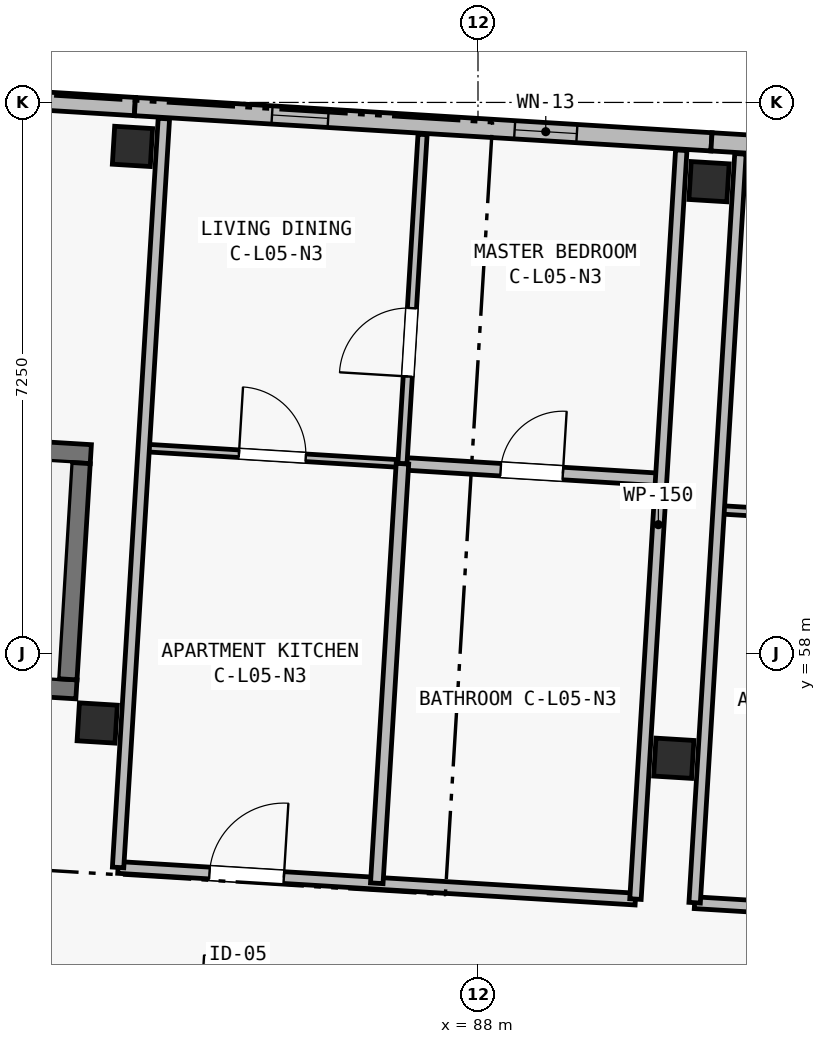
"""IFC4 building model, lengths in metres.
Left out: names, types, materials, properties, quantities, classifications, styles, units other than length and angle.
Written with IfcOpenShell. Run it as: python <this file> out.ifc"""

import sys

from ifc_helpers import new_model, si_unit, direction, frame, frame_2d, origin, origin_2d, place, context, subcontext, project, spatial, rectangle, extrude, element, fill, save


model = new_model("IFC4")
c1 = context("Model", 3, precision=1e-05, world=origin(), true_north=direction((0.0, 1.0)))
c2 = subcontext(c1, "Body", "Model", "MODEL_VIEW")
j1 = project(units=[si_unit("LENGTHUNIT", "METRE"), si_unit("PLANEANGLEUNIT", "RADIAN")], contexts=[c1])
p1 = place(None, origin())
s1 = spatial("IfcSite", under=j1, at=p1, CompositionType="ELEMENT")
p2 = place(p1, origin())
s2 = spatial("IfcBuilding", under=s1, at=p2, CompositionType="ELEMENT")
p3 = place(p2, frame((0.0, 0.0, 18.15)))
s3 = spatial("IfcBuildingStorey", under=s2, at=p3, CompositionType="ELEMENT", Elevation=18.15)
for number, where, z_axis, x_axis in (
    (1, (82.99, 57.086, 0.0), (0.0, 0.0, 1.0), (0.998, -0.061, 0.0)),
    (2, (83.454, 64.672, 0.0), (0.0, 0.0, 1.0), (0.998, -0.061, 0.0)),
    (3, (90.576, 56.622, 0.0), (0.0, 0.0, 1.0), (0.998, -0.061, 0.0)),
    (4, (91.04, 64.208, 0.0), (0.0, 0.0, 1.0), (0.998, -0.061, 0.0)),
):
    element("IfcColumn", number, at=place(p3, frame(where, z_axis=z_axis, x_axis=x_axis)), inside=s3, PredefinedType="COLUMN", context=c2, shape_type="SweptSolid", body=[
        extrude(rectangle(XDim=0.5, YDim=0.5, at=origin_2d()), origin(), (0.0, 0.0, 1.0), 3.25),
    ])
p4 = place(p3, frame((75.919, 61.05, 0.0), z_axis=(0.0, 0.0, 1.0), x_axis=(0.998135546153, -0.061036313012, 0.0)))
e5 = element("IfcWall", 5, at=p4, inside=s3, PredefinedType="SHEAR", context=c2, shape_type="SweptSolid", body=[
    extrude(rectangle(XDim=7.0, YDim=0.25, at=frame_2d((3.5, 0.0))), origin(), (0.0, 0.0, 1.0), 3.25),
])
p5 = place(p4, frame((0.45, 0.0, 0.0)))
e6 = element("IfcOpeningElement", 6, at=p5, cuts=e5, PredefinedType="OPENING", context=c2, shape_type="SweptSolid", body=[
    extrude(rectangle(XDim=0.9, YDim=2.1, at=frame_2d((0.45, 1.05))), frame((0.0, 0.14, 0.0), z_axis=(0.0, -1.0, 0.0), x_axis=(1.0, 0.0, 0.0)), (0.0, 0.0, 1.0), 0.28),
])
p6 = place(p3, frame((75.73, 57.956, 0.0), z_axis=(0.0, 0.0, 1.0), x_axis=(0.998135546153, -0.061036313012, 0.0)))
e7 = element("IfcWall", 7, at=p6, inside=s3, PredefinedType="SHEAR", context=c2, shape_type="SweptSolid", body=[
    extrude(rectangle(XDim=7.0, YDim=0.25, at=frame_2d((3.5, 0.0))), origin(), (0.0, 0.0, 1.0), 3.25),
])
p7 = place(p6, frame((0.45, 0.0, 0.0)))
e8 = element("IfcOpeningElement", 8, at=p7, cuts=e7, PredefinedType="OPENING", context=c2, shape_type="SweptSolid", body=[
    extrude(rectangle(XDim=1.05, YDim=2.15, at=frame_2d((0.525, 1.075))), frame((0.0, 0.14, 0.0), z_axis=(0.0, -1.0, 0.0), x_axis=(1.0, 0.0, 0.0)), (0.0, 0.0, 1.0), 0.28),
])
p8 = place(p3, frame((82.599, 57.661, 0.0), z_axis=(0.0, 0.0, 1.0), x_axis=(0.06107697143, 0.998133059046, 0.0)))
e9 = element("IfcWall", 9, at=p8, inside=s3, PredefinedType="SHEAR", context=c2, shape_type="SweptSolid", body=[
    extrude(rectangle(XDim=2.85, YDim=0.25, at=frame_2d((1.425, 0.0))), origin(), (0.0, 0.0, 1.0), 3.25),
])
p9 = place(p3, frame((81.115, 65.341, 0.0), z_axis=(0.0, 0.0, 1.0), x_axis=(0.998134103342, -0.061059902923, 0.0)))
e10 = element("IfcWall", 10, at=p9, inside=s3, PredefinedType="SOLIDWALL", context=c2, shape_type="SweptSolid", body=[
    extrude(rectangle(XDim=2.375, YDim=0.24, at=frame_2d((1.188, 0.0))), origin(), (0.0, 0.0, 1.0), 3.0),
])
p10 = place(p3, frame((83.486, 65.196, 0.0), z_axis=(0.0, 0.0, 1.0), x_axis=(0.998135669243, -0.061034300063, 0.0)))
e11 = element("IfcWall", 11, at=p10, inside=s3, PredefinedType="SOLIDWALL", context=c2, shape_type="SweptSolid", body=[
    extrude(rectangle(XDim=7.6, YDim=0.24, at=frame_2d((3.8, 0.0))), origin(), (0.0, 0.0, 1.0), 3.0),
])
p11 = place(p10, frame((1.807, 0.0, 0.44)))
e12 = element("IfcOpeningElement", 12, at=p11, cuts=e11, PredefinedType="OPENING", context=c2, shape_type="SweptSolid", body=[
    extrude(rectangle(XDim=0.74, YDim=2.26, at=frame_2d((0.37, 1.13))), frame((0.0, 0.135, 0.0), z_axis=(0.0, -1.0, 0.0), x_axis=(1.0, 0.0, 0.0)), (0.0, 0.0, 1.0), 0.27),
])
p12 = place(p10, frame((5.006, 0.0, 0.5)))
e13 = element("IfcOpeningElement", 13, at=p12, cuts=e11, PredefinedType="OPENING", context=c2, shape_type="SweptSolid", body=[
    extrude(rectangle(XDim=0.82, YDim=2.18, at=frame_2d((0.41, 1.09))), frame((0.0, 0.135, 0.0), z_axis=(0.0, -1.0, 0.0), x_axis=(1.0, 0.0, 0.0)), (0.0, 0.0, 1.0), 0.27),
])
p13 = place(p3, frame((91.072, 64.732, 0.0), z_axis=(0.0, 0.0, 1.0), x_axis=(0.998133591969, -0.061068261669, 0.0)))
e14 = element("IfcWall", 14, at=p13, inside=s3, PredefinedType="SOLIDWALL", context=c2, shape_type="SweptSolid", body=[
    extrude(rectangle(XDim=7.6, YDim=0.24, at=frame_2d((3.8, 0.0))), origin(), (0.0, 0.0, 1.0), 3.0),
])
p14 = place(p13, frame((1.454, 0.0, 0.5)))
e15 = element("IfcOpeningElement", 15, at=p14, cuts=e14, PredefinedType="OPENING", context=c2, shape_type="SweptSolid", body=[
    extrude(rectangle(XDim=0.58, YDim=2.16, at=frame_2d((0.29, 1.08))), frame((0.0, 0.135, 0.0), z_axis=(0.0, -1.0, 0.0), x_axis=(1.0, 0.0, 0.0)), (0.0, 0.0, 1.0), 0.27),
])
p15 = place(p13, frame((5.982, 0.0, 0.44)))
e16 = element("IfcOpeningElement", 16, at=p15, cuts=e14, PredefinedType="OPENING", context=c2, shape_type="SweptSolid", body=[
    extrude(rectangle(XDim=0.66, YDim=2.32, at=frame_2d((0.33, 1.16))), frame((0.0, 0.135, 0.0), z_axis=(0.0, -1.0, 0.0), x_axis=(1.0, 0.0, 0.0)), (0.0, 0.0, 1.0), 0.27),
])
p16 = place(p3, frame((83.265, 55.185, 0.0), z_axis=(0.0, 0.0, 1.0), x_axis=(0.998135531673, -0.061036549799, 0.0)))
e17 = element("IfcWall", 17, at=p16, inside=s3, PredefinedType="PARTITIONING", context=c2, shape_type="SweptSolid", body=[
    extrude(rectangle(XDim=6.82, YDim=0.155, at=frame_2d((3.41, 0.0))), origin(), (0.0, 0.0, 1.0), 2.97),
])
p17 = place(p16, frame((1.205, 0.0, 0.0)))
e18 = element("IfcOpeningElement", 18, at=p17, cuts=e17, PredefinedType="OPENING", context=c2, shape_type="SweptSolid", body=[
    extrude(rectangle(XDim=0.98, YDim=2.15, at=frame_2d((0.49, 1.075))), frame((0.0, 0.093, 0.0), z_axis=(0.0, -1.0, 0.0), x_axis=(1.0, 0.0, 0.0)), (0.0, 0.0, 1.0), 0.185),
])
p18 = place(p3, frame((83.602, 60.705, 0.0), z_axis=(0.0, 0.0, 1.0), x_axis=(0.998133617109, -0.061067850767, 0.0)))
e19 = element("IfcWall", 19, at=p18, inside=s3, PredefinedType="PARTITIONING", context=c2, shape_type="SweptSolid", body=[
    extrude(rectangle(XDim=3.41, YDim=0.1, at=frame_2d((1.705, 0.0))), origin(), (0.0, 0.0, 1.0), 2.97),
])
p19 = place(p18, frame((1.255, 0.0, 0.0)))
e20 = element("IfcOpeningElement", 20, at=p19, cuts=e19, PredefinedType="OPENING", context=c2, shape_type="SweptSolid", body=[
    extrude(rectangle(XDim=0.88, YDim=2.1, at=frame_2d((0.44, 1.05))), frame((0.0, 0.065, 0.0), z_axis=(0.0, -1.0, 0.0), x_axis=(1.0, 0.0, 0.0)), (0.0, 0.0, 1.0), 0.13),
])
p20 = place(p3, frame((87.006, 60.497, 0.0), z_axis=(0.0, 0.0, 1.0), x_axis=(0.998137711988, -0.061000884486, 0.0)))
e21 = element("IfcWall", 21, at=p20, inside=s3, PredefinedType="PLUMBINGWALL", context=c2, shape_type="SweptSolid", body=[
    extrude(rectangle(XDim=3.41, YDim=0.165, at=frame_2d((1.705, 0.0))), origin(), (0.0, 0.0, 1.0), 2.97),
])
p21 = place(p20, frame((1.295, 0.0, 0.0)))
e22 = element("IfcOpeningElement", 22, at=p21, cuts=e21, PredefinedType="OPENING", context=c2, shape_type="SweptSolid", body=[
    extrude(rectangle(XDim=0.82, YDim=2.08, at=frame_2d((0.41, 1.04))), frame((0.0, 0.097, 0.0), z_axis=(0.0, -1.0, 0.0), x_axis=(1.0, 0.0, 0.0)), (0.0, 0.0, 1.0), 0.195),
])
p22 = place(p3, frame((87.006, 60.497, 0.0), z_axis=(0.0, 0.0, 1.0), x_axis=(0.06103343432, 0.998135722182, 0.0)))
e23 = element("IfcWall", 23, at=p22, inside=s3, PredefinedType="PARTITIONING", context=c2, shape_type="SweptSolid", body=[
    extrude(rectangle(XDim=4.34, YDim=0.12, at=frame_2d((2.17, 0.0))), origin(), (0.0, 0.0, 1.0), 2.97),
])
p23 = place(p22, frame((1.15, 0.0, 0.0)))
e24 = element("IfcOpeningElement", 24, at=p23, cuts=e23, PredefinedType="OPENING", context=c2, shape_type="SweptSolid", body=[
    extrude(rectangle(XDim=0.9, YDim=2.1, at=frame_2d((0.45, 1.05))), frame((0.0, 0.075, 0.0), z_axis=(0.0, -1.0, 0.0), x_axis=(1.0, 0.0, 0.0)), (0.0, 0.0, 1.0), 0.15),
])
p24 = place(p3, frame((86.668, 54.977, 0.0), z_axis=(0.0, 0.0, 1.0), x_axis=(0.061058897293, 0.99813416486, 0.0)))
e25 = element("IfcWall", 25, at=p24, inside=s3, PredefinedType="PLUMBINGWALL", context=c2, shape_type="SweptSolid", body=[
    extrude(rectangle(XDim=5.53, YDim=0.165, at=frame_2d((2.765, 0.0))), origin(), (0.0, 0.0, 1.0), 2.97),
])
p25 = place(p3, frame((83.265, 55.185, 0.0), z_axis=(0.0, 0.0, 1.0), x_axis=(0.061046193261, 0.998134941923, 0.0)))
e26 = element("IfcWall", 26, at=p25, inside=s3, PredefinedType="PARTITIONING", context=c2, shape_type="SweptSolid", body=[
    extrude(rectangle(XDim=9.87, YDim=0.15, at=frame_2d((4.935, 0.0))), origin(), (0.0, 0.0, 1.0), 2.97),
])
p26 = place(p3, frame((90.072, 54.769, 0.0), z_axis=(0.0, 0.0, 1.0), x_axis=(0.061047700465, 0.998134849741, 0.0)))
e27 = element("IfcWall", 27, at=p26, inside=s3, PredefinedType="PARTITIONING", context=c2, shape_type="SweptSolid", body=[
    extrude(rectangle(XDim=9.87, YDim=0.15, at=frame_2d((4.935, 0.0))), origin(), (0.0, 0.0, 1.0), 2.97),
])
p27 = place(p3, frame((90.85, 54.721, 0.0), z_axis=(0.0, 0.0, 1.0), x_axis=(0.998135665032, -0.06103436893, 0.0)))
e28 = element("IfcWall", 28, at=p27, inside=s3, PredefinedType="PARTITIONING", context=c2, shape_type="SweptSolid", body=[
    extrude(rectangle(XDim=6.82, YDim=0.155, at=frame_2d((3.41, 0.0))), origin(), (0.0, 0.0, 1.0), 2.97),
])
p28 = place(p27, frame((1.205, 0.0, 0.0)))
e29 = element("IfcOpeningElement", 29, at=p28, cuts=e28, PredefinedType="OPENING", context=c2, shape_type="SweptSolid", body=[
    extrude(rectangle(XDim=1.02, YDim=2.2, at=frame_2d((0.51, 1.1))), frame((0.0, 0.093, 0.0), z_axis=(0.0, -1.0, 0.0), x_axis=(1.0, 0.0, 0.0)), (0.0, 0.0, 1.0), 0.185),
])
p29 = place(p3, frame((91.167, 59.892, 0.0), z_axis=(0.0, 0.0, 1.0), x_axis=(0.998133617109, -0.061067850767, 0.0)))
e30 = element("IfcWall", 30, at=p29, inside=s3, PredefinedType="PARTITIONING", context=c2, shape_type="SweptSolid", body=[
    extrude(rectangle(XDim=3.41, YDim=0.11, at=frame_2d((1.705, 0.0))), origin(), (0.0, 0.0, 1.0), 2.97),
])
p30 = place(p29, frame((1.255, 0.0, 0.0)))
e31 = element("IfcOpeningElement", 31, at=p30, cuts=e30, PredefinedType="OPENING", context=c2, shape_type="SweptSolid", body=[
    extrude(rectangle(XDim=0.9, YDim=2.1, at=frame_2d((0.45, 1.05))), frame((0.0, 0.07, 0.0), z_axis=(0.0, -1.0, 0.0), x_axis=(1.0, 0.0, 0.0)), (0.0, 0.0, 1.0), 0.14),
])
p31 = place(p3, frame((90.85, 54.721, 0.0), z_axis=(0.0, 0.0, 1.0), x_axis=(0.061047700465, 0.998134849741, 0.0)))
e32 = element("IfcWall", 32, at=p31, inside=s3, PredefinedType="PARTITIONING", context=c2, shape_type="SweptSolid", body=[
    extrude(rectangle(XDim=9.87, YDim=0.15, at=frame_2d((4.935, 0.0))), origin(), (0.0, 0.0, 1.0), 2.97),
])
p32 = place(p11, origin())
e33 = element("IfcWindow", 33, at=p32, inside=s3, PartitioningType="SINGLE_PANEL", PredefinedType="WINDOW", context=c2, shape_type="SweptSolid", body=[
    extrude(rectangle(XDim=0.74, YDim=2.26, at=frame_2d((0.37, 1.13))), frame((0.0, 0.03, 0.0), z_axis=(0.0, -1.0, 0.0), x_axis=(1.0, 0.0, 0.0)), (0.0, 0.0, 1.0), 0.06),
])
fill(e12, e33)
p33 = place(p12, origin())
e34 = element("IfcWindow", 34, at=p33, inside=s3, PartitioningType="SINGLE_PANEL", PredefinedType="WINDOW", context=c2, shape_type="SweptSolid", body=[
    extrude(rectangle(XDim=0.82, YDim=2.18, at=frame_2d((0.41, 1.09))), frame((0.0, 0.03, 0.0), z_axis=(0.0, -1.0, 0.0), x_axis=(1.0, 0.0, 0.0)), (0.0, 0.0, 1.0), 0.06),
])
fill(e13, e34)
p34 = place(p17, origin())
e35 = element("IfcDoor", 35, at=p34, inside=s3, OperationType="SINGLE_SWING_RIGHT", PredefinedType="DOOR", context=c2, shape_type="SweptSolid", body=[
    extrude(rectangle(XDim=0.98, YDim=2.15, at=frame_2d((0.49, 1.075))), frame((0.0, 0.025, 0.0), z_axis=(0.0, -1.0, 0.0), x_axis=(1.0, 0.0, 0.0)), (0.0, 0.0, 1.0), 0.05),
])
fill(e18, e35)
p35 = place(p19, origin())
e36 = element("IfcDoor", 36, at=p35, inside=s3, OperationType="SINGLE_SWING_LEFT", PredefinedType="DOOR", context=c2, shape_type="SweptSolid", body=[
    extrude(rectangle(XDim=0.88, YDim=2.1, at=frame_2d((0.44, 1.05))), frame((0.0, 0.025, 0.0), z_axis=(0.0, -1.0, 0.0), x_axis=(1.0, 0.0, 0.0)), (0.0, 0.0, 1.0), 0.05),
])
fill(e20, e36)
p36 = place(p21, origin())
e37 = element("IfcDoor", 37, at=p36, inside=s3, OperationType="SINGLE_SWING_RIGHT", PredefinedType="DOOR", context=c2, shape_type="SweptSolid", body=[
    extrude(rectangle(XDim=0.82, YDim=2.08, at=frame_2d((0.41, 1.04))), frame((0.0, 0.025, 0.0), z_axis=(0.0, -1.0, 0.0), x_axis=(1.0, 0.0, 0.0)), (0.0, 0.0, 1.0), 0.05),
])
fill(e22, e37)
p37 = place(p23, origin())
e38 = element("IfcDoor", 38, at=p37, inside=s3, OperationType="SINGLE_SWING_LEFT", PredefinedType="DOOR", context=c2, shape_type="SweptSolid", body=[
    extrude(rectangle(XDim=0.9, YDim=2.1, at=frame_2d((0.45, 1.05))), frame((0.0, 0.025, 0.0), z_axis=(0.0, -1.0, 0.0), x_axis=(1.0, 0.0, 0.0)), (0.0, 0.0, 1.0), 0.05),
])
fill(e24, e38)
save(model, sys.argv[1])
